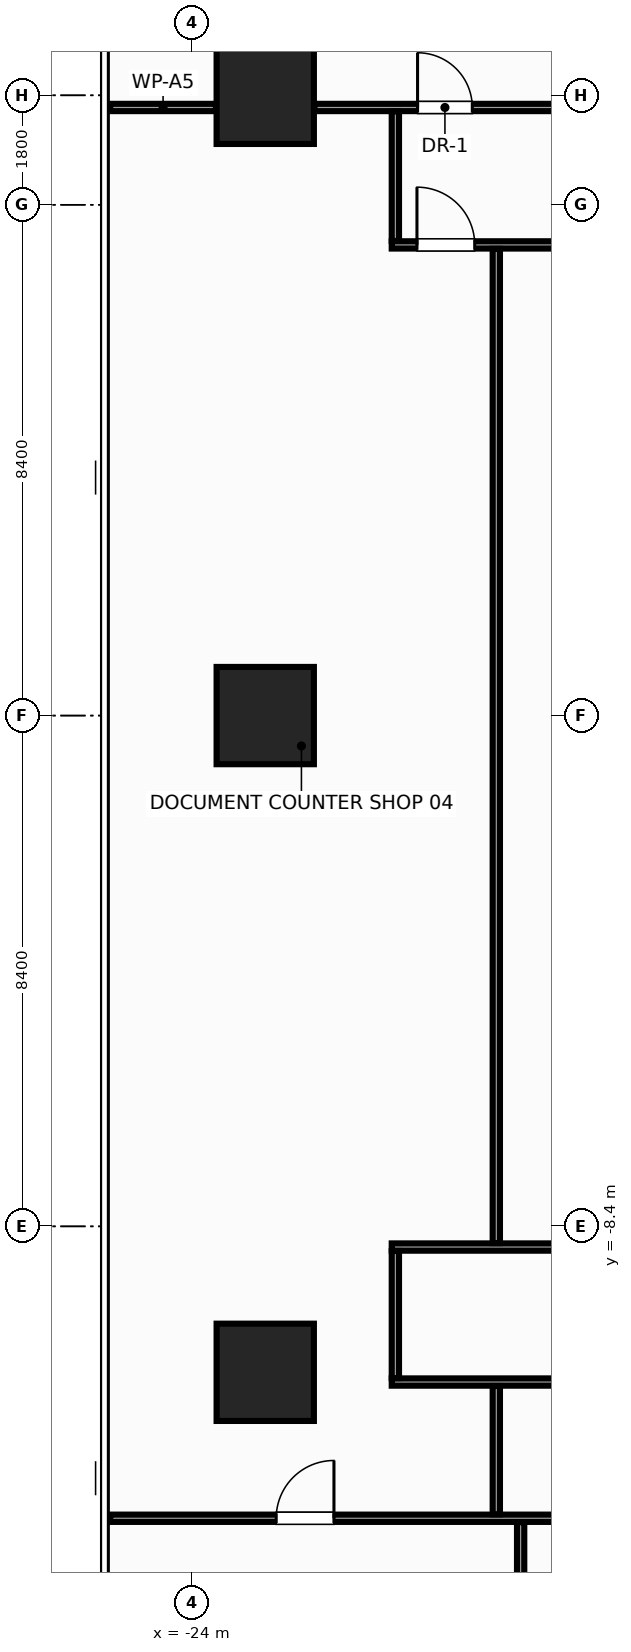
"""IFC4 building model, lengths in metres.
Left out: names, types, materials, properties, quantities, classifications, styles, units other than length and angle.
Written with IfcOpenShell. Run it as: python <this file> out.ifc"""

import sys

from ifc_helpers import new_model, si_unit, direction, frame, frame_2d, origin, origin_2d, place, context, subcontext, project, spatial, rectangle, extrude, source, transform, mapped, element, fill, save


model = new_model("IFC4")
c1 = context("Model", 3, precision=1e-05, world=origin(), true_north=direction((0.0, 1.0)))
c2 = subcontext(c1, "Body", "Model", "MODEL_VIEW")
j1 = project(units=[si_unit("LENGTHUNIT", "METRE"), si_unit("PLANEANGLEUNIT", "RADIAN")], contexts=[c1])
p1 = place(None, origin())
s1 = spatial("IfcSite", under=j1, at=p1, CompositionType="ELEMENT")
p2 = place(p1, origin())
s2 = spatial("IfcBuilding", under=s1, at=p2, CompositionType="ELEMENT")
p3 = place(p2, frame((0.0, 0.0, 81.2)))
s3 = spatial("IfcBuildingStorey", under=s2, at=p3, CompositionType="ELEMENT", Elevation=81.2)
m1 = source(origin(), c2, "Body", "SweptSolid", [
    extrude(rectangle(XDim=1.6, YDim=1.6, at=origin_2d()), origin(), (0.0, 0.0, 1.0), 3.6),
])
for number, where, z_axis, x_axis in (
    (1, (-22.8, -10.8, 0.0), (0.0, 0.0, 1.0), (1.0, 0.0, 0.0)),
    (2, (-22.8, 0.0, 0.0), (0.0, 0.0, 1.0), (1.0, 0.0, 0.0)),
    (3, (-22.8, 10.2, 0.0), (0.0, 0.0, 1.0), (1.0, 0.0, 0.0)),
):
    element("IfcColumn", number, at=place(p3, frame(where, z_axis=z_axis, x_axis=x_axis)), inside=s3, PredefinedType="COLUMN", context=c2, shape_type="MappedRepresentation", body=[
        mapped(m1, transform((0.0, 0.0, 0.0), x_axis=(1.0, 0.0, 0.0), y_axis=(0.0, 1.0, 0.0), z_axis=(0.0, 0.0, 1.0), scale=1.0)),
    ])
m2 = source(origin(), c2, "Body", "SweptSolid", [
    extrude(rectangle(XDim=1.74, YDim=0.12, at=frame_2d((0.87, 0.0))), origin(), (0.0, 0.0, 1.0), 3.36),
])
p4 = place(p3, frame((-25.35, 10.0, 0.0), z_axis=(0.0, 0.0, 1.0), x_axis=(1.0, 0.0, 0.0)))
e4 = element("IfcWall", 4, at=p4, inside=s3, PredefinedType="PARTITIONING", context=c2, shape_type="MappedRepresentation", body=[
    mapped(m2, transform((0.0, 0.0, 0.0), x_axis=(1.0, 0.0, 0.0), y_axis=(0.0, 1.0, 0.0), z_axis=(0.0, 0.0, 1.0), scale=1.0)),
])
m3 = source(origin(), c2, "Body", "SweptSolid", [
    extrude(rectangle(XDim=4.38, YDim=0.12, at=frame_2d((2.19, 0.0))), origin(), (0.0, 0.0, 1.0), 2.745),
])
p5 = place(p3, frame((-21.99, 10.0, 0.0), z_axis=(0.0, 0.0, 1.0), x_axis=(1.0, 0.0, 0.0)))
e5 = element("IfcWall", 5, at=p5, inside=s3, PredefinedType="PARTITIONING", context=c2, shape_type="MappedRepresentation", body=[
    mapped(m3, transform((0.0, 0.0, 0.0), x_axis=(1.0, 0.0, 0.0), y_axis=(0.0, 1.0, 0.0), z_axis=(0.0, 0.0, 1.0), scale=1.0)),
])
p6 = place(p5, frame((1.695, 0.0, 0.0)))
e6 = element("IfcOpeningElement", 6, at=p6, cuts=e5, PredefinedType="OPENING", context=c2, shape_type="SweptSolid", body=[
    extrude(rectangle(XDim=0.9, YDim=2.15, at=frame_2d((0.45, 1.075))), frame((0.0, 0.072, 0.0), z_axis=(0.0, -1.0, 0.0), x_axis=(1.0, 0.0, 0.0)), (0.0, 0.0, 1.0), 0.144),
])
m4 = source(origin(), c2, "Body", "SweptSolid", [
    extrude(rectangle(XDim=16.8, YDim=0.12, at=frame_2d((8.4, 0.0))), origin(), (0.0, 0.0, 1.0), 2.745),
])
p7 = place(p3, frame((-20.72, 7.74, 0.0), z_axis=(0.0, 0.0, 1.0), x_axis=(1.0, 0.0, 0.0)))
e7 = element("IfcWall", 7, at=p7, inside=s3, PredefinedType="PARTITIONING", context=c2, shape_type="MappedRepresentation", body=[
    mapped(m4, transform((0.0, 0.0, 0.0), x_axis=(1.0, 0.0, 0.0), y_axis=(0.0, 1.0, 0.0), z_axis=(0.0, 0.0, 1.0), scale=1.0)),
])
p8 = place(p7, frame((8.825, 0.0, 0.0)))
e8 = element("IfcOpeningElement", 8, at=p8, cuts=e7, PredefinedType="OPENING", context=c2, shape_type="SweptSolid", body=[
    extrude(rectangle(XDim=0.95, YDim=2.15, at=frame_2d((0.475, 1.075))), frame((0.0, 0.072, 0.0), z_axis=(0.0, -1.0, 0.0), x_axis=(1.0, 0.0, 0.0)), (0.0, 0.0, 1.0), 0.144),
])
p9 = place(p7, frame((0.415, 0.0, 0.0)))
e9 = element("IfcOpeningElement", 9, at=p9, cuts=e7, PredefinedType="OPENING", context=c2, shape_type="SweptSolid", body=[
    extrude(rectangle(XDim=0.95, YDim=2.15, at=frame_2d((0.475, 1.075))), frame((0.0, 0.072, 0.0), z_axis=(0.0, -1.0, 0.0), x_axis=(1.0, 0.0, 0.0)), (0.0, 0.0, 1.0), 0.144),
])
p10 = place(p3, frame((-20.72, -8.74, 0.0), z_axis=(0.0, 0.0, 1.0), x_axis=(1.0, 0.0, 0.0)))
e10 = element("IfcWall", 10, at=p10, inside=s3, PredefinedType="PARTITIONING", context=c2, shape_type="MappedRepresentation", body=[
    mapped(m4, transform((0.0, 0.0, 0.0), x_axis=(1.0, 0.0, 0.0), y_axis=(0.0, 1.0, 0.0), z_axis=(0.0, 0.0, 1.0), scale=1.0)),
])
m5 = source(origin(), c2, "Body", "SweptSolid", [
    extrude(rectangle(XDim=3.11, YDim=0.12, at=frame_2d((1.555, 0.0))), origin(), (0.0, 0.0, 1.0), 2.745),
])
p11 = place(p3, frame((-20.72, -10.96, 0.0), z_axis=(0.0, 0.0, 1.0), x_axis=(1.0, 0.0, 0.0)))
e11 = element("IfcWall", 11, at=p11, inside=s3, PredefinedType="PARTITIONING", context=c2, shape_type="MappedRepresentation", body=[
    mapped(m5, transform((0.0, 0.0, 0.0), x_axis=(1.0, 0.0, 0.0), y_axis=(0.0, 1.0, 0.0), z_axis=(0.0, 0.0, 1.0), scale=1.0)),
])
m6 = source(origin(), c2, "Body", "SweptSolid", [
    extrude(rectangle(XDim=2.13, YDim=0.12, at=frame_2d((1.065, 0.0))), origin(), (0.0, 0.0, 1.0), 3.36),
])
p12 = place(p3, frame((-20.66, 7.805, 0.0), z_axis=(0.0, 0.0, 1.0), x_axis=(0.0, 1.0, 0.0)))
e12 = element("IfcWall", 12, at=p12, inside=s3, PredefinedType="PARTITIONING", context=c2, shape_type="MappedRepresentation", body=[
    mapped(m6, transform((0.0, 0.0, 0.0), x_axis=(1.0, 0.0, 0.0), y_axis=(0.0, 1.0, 0.0), z_axis=(0.0, 0.0, 1.0), scale=1.0)),
])
m7 = source(origin(), c2, "Body", "SweptSolid", [
    extrude(rectangle(XDim=2.09, YDim=0.12, at=frame_2d((1.045, 0.0))), origin(), (0.0, 0.0, 1.0), 3.36),
])
p13 = place(p3, frame((-20.66, -10.895, 0.0), z_axis=(0.0, 0.0, 1.0), x_axis=(0.0, 1.0, 0.0)))
e13 = element("IfcWall", 13, at=p13, inside=s3, PredefinedType="PARTITIONING", context=c2, shape_type="MappedRepresentation", body=[
    mapped(m7, transform((0.0, 0.0, 0.0), x_axis=(1.0, 0.0, 0.0), y_axis=(0.0, 1.0, 0.0), z_axis=(0.0, 0.0, 1.0), scale=1.0)),
])
m8 = source(origin(), c2, "Body", "SweptSolid", [
    extrude(rectangle(XDim=50.7, YDim=0.12, at=frame_2d((25.35, 0.0))), origin(), (0.0, 0.0, 1.0), 2.945),
])
p14 = place(p3, frame((-25.35, -13.2, 0.0), z_axis=(0.0, 0.0, 1.0), x_axis=(1.0, 0.0, 0.0)))
e14 = element("IfcWall", 14, at=p14, inside=s3, PredefinedType="PARTITIONING", context=c2, shape_type="MappedRepresentation", body=[
    mapped(m8, transform((0.0, 0.0, 0.0), x_axis=(1.0, 0.0, 0.0), y_axis=(0.0, 1.0, 0.0), z_axis=(0.0, 0.0, 1.0), scale=1.0)),
])
p15 = place(p14, frame((46.92, 0.0, 0.0)))
e15 = element("IfcOpeningElement", 15, at=p15, cuts=e14, PredefinedType="OPENING", context=c2, shape_type="SweptSolid", body=[
    extrude(rectangle(XDim=0.95, YDim=2.15, at=frame_2d((0.475, 1.075))), frame((0.0, 0.072, 0.0), z_axis=(0.0, -1.0, 0.0), x_axis=(1.0, 0.0, 0.0)), (0.0, 0.0, 1.0), 0.144),
])
p16 = place(p14, frame((2.73, 0.0, 0.0)))
e16 = element("IfcOpeningElement", 16, at=p16, cuts=e14, PredefinedType="OPENING", context=c2, shape_type="SweptSolid", body=[
    extrude(rectangle(XDim=0.95, YDim=2.15, at=frame_2d((0.475, 1.075))), frame((0.0, 0.072, 0.0), z_axis=(0.0, -1.0, 0.0), x_axis=(1.0, 0.0, 0.0)), (0.0, 0.0, 1.0), 0.144),
])
p17 = place(p14, frame((9.375, 0.0, 0.0)))
e17 = element("IfcOpeningElement", 17, at=p17, cuts=e14, PredefinedType="OPENING", context=c2, shape_type="SweptSolid", body=[
    extrude(rectangle(XDim=0.95, YDim=2.15, at=frame_2d((0.475, 1.075))), frame((0.0, 0.072, 0.0), z_axis=(0.0, -1.0, 0.0), x_axis=(1.0, 0.0, 0.0)), (0.0, 0.0, 1.0), 0.144),
])
p18 = place(p14, frame((15.875, 0.0, 0.0)))
e18 = element("IfcOpeningElement", 18, at=p18, cuts=e14, PredefinedType="OPENING", context=c2, shape_type="SweptSolid", body=[
    extrude(rectangle(XDim=0.95, YDim=2.15, at=frame_2d((0.475, 1.075))), frame((0.0, 0.072, 0.0), z_axis=(0.0, -1.0, 0.0), x_axis=(1.0, 0.0, 0.0)), (0.0, 0.0, 1.0), 0.144),
])
p19 = place(p14, frame((24.875, 0.0, 0.0)))
e19 = element("IfcOpeningElement", 19, at=p19, cuts=e14, PredefinedType="OPENING", context=c2, shape_type="SweptSolid", body=[
    extrude(rectangle(XDim=0.95, YDim=2.15, at=frame_2d((0.475, 1.075))), frame((0.0, 0.072, 0.0), z_axis=(0.0, -1.0, 0.0), x_axis=(1.0, 0.0, 0.0)), (0.0, 0.0, 1.0), 0.144),
])
p20 = place(p14, frame((35.375, 0.0, 0.0)))
e20 = element("IfcOpeningElement", 20, at=p20, cuts=e14, PredefinedType="OPENING", context=c2, shape_type="SweptSolid", body=[
    extrude(rectangle(XDim=0.95, YDim=2.15, at=frame_2d((0.475, 1.075))), frame((0.0, 0.072, 0.0), z_axis=(0.0, -1.0, 0.0), x_axis=(1.0, 0.0, 0.0)), (0.0, 0.0, 1.0), 0.144),
])
p21 = place(p14, frame((40.675, 0.0, 0.0)))
e21 = element("IfcOpeningElement", 21, at=p21, cuts=e14, PredefinedType="OPENING", context=c2, shape_type="SweptSolid", body=[
    extrude(rectangle(XDim=0.95, YDim=2.15, at=frame_2d((0.475, 1.075))), frame((0.0, 0.072, 0.0), z_axis=(0.0, -1.0, 0.0), x_axis=(1.0, 0.0, 0.0)), (0.0, 0.0, 1.0), 0.144),
])
m9 = source(origin(), c2, "Body", "SweptSolid", [
    extrude(rectangle(XDim=2.11, YDim=0.12, at=frame_2d((1.055, 0.0))), origin(), (0.0, 0.0, 1.0), 3.36),
])
p22 = place(p3, frame((-19.0, -13.135, 0.0), z_axis=(0.0, 0.0, 1.0), x_axis=(0.0, 1.0, 0.0)))
e22 = element("IfcWall", 22, at=p22, inside=s3, PredefinedType="PARTITIONING", context=c2, shape_type="MappedRepresentation", body=[
    mapped(m9, transform((0.0, 0.0, 0.0), x_axis=(1.0, 0.0, 0.0), y_axis=(0.0, 1.0, 0.0), z_axis=(0.0, 0.0, 1.0), scale=1.0)),
])
m10 = source(origin(), c2, "Body", "SweptSolid", [
    extrude(rectangle(XDim=16.35, YDim=0.12, at=frame_2d((8.175, 0.0))), origin(), (0.0, 0.0, 1.0), 2.745),
])
p23 = place(p3, frame((-19.0, -8.675, 0.0), z_axis=(0.0, 0.0, 1.0), x_axis=(0.0, 1.0, 0.0)))
e23 = element("IfcWall", 23, at=p23, inside=s3, PredefinedType="PARTITIONING", context=c2, shape_type="MappedRepresentation", body=[
    mapped(m10, transform((0.0, 0.0, 0.0), x_axis=(1.0, 0.0, 0.0), y_axis=(0.0, 1.0, 0.0), z_axis=(0.0, 0.0, 1.0), scale=1.0)),
])
m11 = source(origin(), c2, "Body", "SweptSolid", [
    extrude(rectangle(XDim=12.385, YDim=0.12, at=frame_2d((6.192, 0.0))), origin(), (0.0, 0.0, 1.0), 2.745),
])
p24 = place(p3, frame((-18.6, -25.65, 0.0), z_axis=(0.0, 0.0, 1.0), x_axis=(0.0, 1.0, 0.0)))
e24 = element("IfcWall", 24, at=p24, inside=s3, PredefinedType="PARTITIONING", context=c2, shape_type="MappedRepresentation", body=[
    mapped(m11, transform((0.0, 0.0, 0.0), x_axis=(1.0, 0.0, 0.0), y_axis=(0.0, 1.0, 0.0), z_axis=(0.0, 0.0, 1.0), scale=1.0)),
])
m12 = source(origin(), c2, "Body", "SweptSolid", [
    extrude(rectangle(XDim=0.9, YDim=2.15, at=frame_2d((0.45, 1.075))), frame((0.0, 0.025, 0.0), z_axis=(0.0, -1.0, 0.0), x_axis=(1.0, 0.0, 0.0)), (0.0, 0.0, 1.0), 0.05),
])
p25 = place(p6, origin())
e25 = element("IfcDoor", 25, at=p25, inside=s3, OperationType="SINGLE_SWING_LEFT", PredefinedType="DOOR", context=c2, shape_type="MappedRepresentation", body=[
    mapped(m12, transform((0.0, 0.0, 0.0), x_axis=(1.0, 0.0, 0.0), y_axis=(0.0, 1.0, 0.0), z_axis=(0.0, 0.0, 1.0), scale=1.0)),
])
fill(e6, e25)
m13 = source(origin(), c2, "Body", "SweptSolid", [
    extrude(rectangle(XDim=0.95, YDim=2.15, at=frame_2d((0.475, 1.075))), frame((0.0, 0.025, 0.0), z_axis=(0.0, -1.0, 0.0), x_axis=(1.0, 0.0, 0.0)), (0.0, 0.0, 1.0), 0.05),
])
p26 = place(p9, origin())
e26 = element("IfcDoor", 26, at=p26, inside=s3, OperationType="SINGLE_SWING_LEFT", PredefinedType="DOOR", context=c2, shape_type="MappedRepresentation", body=[
    mapped(m13, transform((0.0, 0.0, 0.0), x_axis=(1.0, 0.0, 0.0), y_axis=(0.0, 1.0, 0.0), z_axis=(0.0, 0.0, 1.0), scale=1.0)),
])
fill(e9, e26)
p27 = place(p16, origin())
e27 = element("IfcDoor", 27, at=p27, inside=s3, OperationType="SINGLE_SWING_RIGHT", PredefinedType="DOOR", context=c2, shape_type="MappedRepresentation", body=[
    mapped(m13, transform((0.0, 0.0, 0.0), x_axis=(1.0, 0.0, 0.0), y_axis=(0.0, 1.0, 0.0), z_axis=(0.0, 0.0, 1.0), scale=1.0)),
])
fill(e16, e27)
save(model, sys.argv[1])
